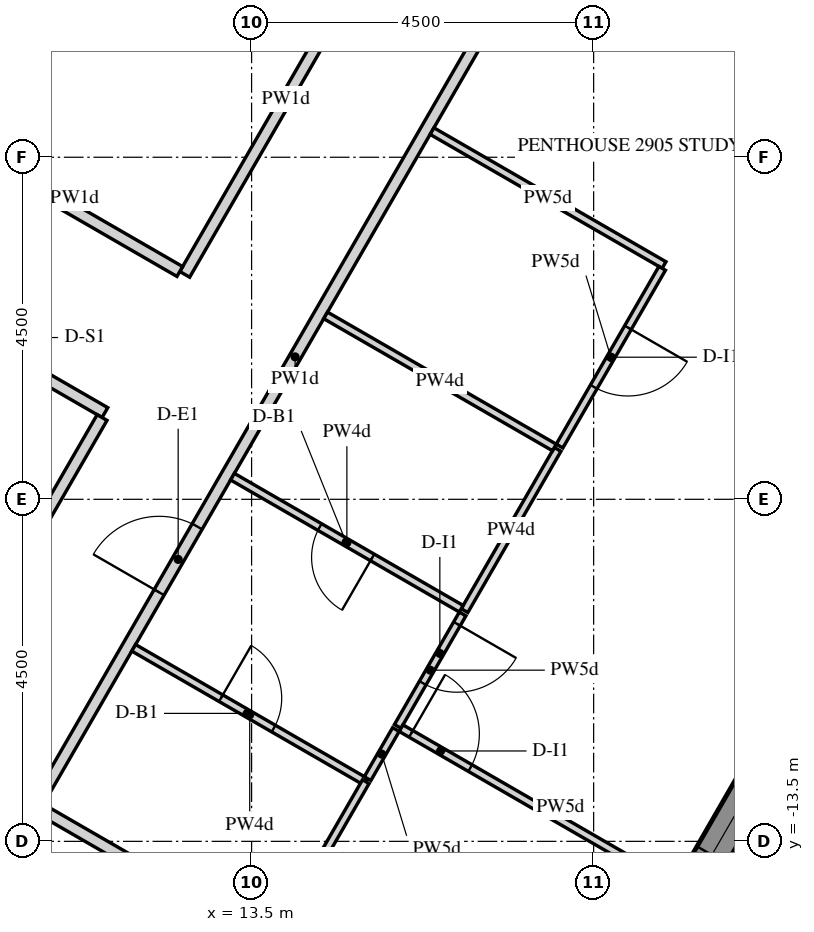
"""IFC4 building model, lengths in metres.
Left out: names, types, materials, properties, quantities, classifications, styles, units other than length and angle.
Written with IfcOpenShell. Run it as: python <this file> out.ifc"""

import sys

from ifc_helpers import new_model, si_unit, direction, frame, frame_2d, origin, place, context, subcontext, project, spatial, polyline, rectangle, outline, extrude, element, fill, save


model = new_model("IFC4")
c1 = context("Model", 3, precision=1e-05, world=origin(), true_north=direction((0.0, 1.0)))
c2 = subcontext(c1, "Body", "Model", "MODEL_VIEW")
j1 = project(units=[si_unit("LENGTHUNIT", "METRE"), si_unit("PLANEANGLEUNIT", "RADIAN")], contexts=[c1])
p1 = place(None, origin())
s1 = spatial("IfcSite", under=j1, at=p1, CompositionType="ELEMENT")
p2 = place(p1, origin())
s2 = spatial("IfcBuilding", under=s1, at=p2, CompositionType="ELEMENT")
p3 = place(p2, frame((0.0, 0.0, 369.0)))
s3 = spatial("IfcBuildingStorey", under=s2, at=p3, CompositionType="ELEMENT", Elevation=369.0)
p4 = place(p3, frame((15.273, -21.097, -0.15), z_axis=(0.0, 0.0, 1.0), x_axis=(0.499997453958, 0.866026873738, 0.0)))
e1 = element("IfcWall", 1, at=p4, inside=s3, PredefinedType="SOLIDWALL", context=c2, shape_type="SweptSolid", body=[
    extrude(outline(polyline([(-0.018, -0.225), (23.152, -0.225), (23.11, 0.225), (0.018, 0.225), (-0.018, -0.225)])), origin(), (0.0, 0.0, 1.0), 3.9),
])
p5 = place(p4, frame((1.366, 0.0, 0.45)))
e2 = element("IfcOpeningElement", 2, at=p5, cuts=e1, PredefinedType="OPENING", context=c2, shape_type="SweptSolid", body=[
    extrude(rectangle(XDim=2.4, YDim=3.0, at=frame_2d((1.2, 1.5))), frame((0.0, 0.235, 0.0), z_axis=(0.0, -1.0, 0.0), x_axis=(1.0, 0.0, 0.0)), (0.0, 0.0, 1.0), 0.47),
])
p6 = place(p4, frame((4.966, 0.0, 0.45)))
e3 = element("IfcOpeningElement", 3, at=p6, cuts=e1, PredefinedType="OPENING", context=c2, shape_type="SweptSolid", body=[
    extrude(rectangle(XDim=2.4, YDim=3.0, at=frame_2d((1.2, 1.5))), frame((0.0, 0.235, 0.0), z_axis=(0.0, -1.0, 0.0), x_axis=(1.0, 0.0, 0.0)), (0.0, 0.0, 1.0), 0.47),
])
p7 = place(p4, frame((8.566, 0.0, 0.45)))
e4 = element("IfcOpeningElement", 4, at=p7, cuts=e1, PredefinedType="OPENING", context=c2, shape_type="SweptSolid", body=[
    extrude(rectangle(XDim=2.4, YDim=3.0, at=frame_2d((1.2, 1.5))), frame((0.0, 0.235, 0.0), z_axis=(0.0, -1.0, 0.0), x_axis=(1.0, 0.0, 0.0)), (0.0, 0.0, 1.0), 0.47),
])
p8 = place(p4, frame((12.166, 0.0, 0.45)))
e5 = element("IfcOpeningElement", 5, at=p8, cuts=e1, PredefinedType="OPENING", context=c2, shape_type="SweptSolid", body=[
    extrude(rectangle(XDim=2.4, YDim=3.0, at=frame_2d((1.2, 1.5))), frame((0.0, 0.235, 0.0), z_axis=(0.0, -1.0, 0.0), x_axis=(1.0, 0.0, 0.0)), (0.0, 0.0, 1.0), 0.47),
])
p9 = place(p4, frame((15.766, 0.0, 0.45)))
e6 = element("IfcOpeningElement", 6, at=p9, cuts=e1, PredefinedType="OPENING", context=c2, shape_type="SweptSolid", body=[
    extrude(rectangle(XDim=2.4, YDim=3.0, at=frame_2d((1.2, 1.5))), frame((0.0, 0.235, 0.0), z_axis=(0.0, -1.0, 0.0), x_axis=(1.0, 0.0, 0.0)), (0.0, 0.0, 1.0), 0.47),
])
p10 = place(p4, frame((19.366, 0.0, 0.45)))
e7 = element("IfcOpeningElement", 7, at=p10, cuts=e1, PredefinedType="OPENING", context=c2, shape_type="SweptSolid", body=[
    extrude(rectangle(XDim=2.4, YDim=3.0, at=frame_2d((1.2, 1.5))), frame((0.0, 0.235, 0.0), z_axis=(0.0, -1.0, 0.0), x_axis=(1.0, 0.0, 0.0)), (0.0, 0.0, 1.0), 0.47),
])
p11 = place(p3, frame((5.673, -9.825, -0.15), z_axis=(0.0, 0.0, 1.0), x_axis=(0.499995046907, 0.866028263435, 0.0)))
e8 = element("IfcWall", 8, at=p11, inside=s3, PredefinedType="SHEAR", context=c2, shape_type="SweptSolid", body=[
    extrude(outline(polyline([(-0.101, -0.175), (11.446, -0.175), (11.244, 0.175), (0.101, 0.175), (-0.101, -0.175)])), origin(), (0.0, 0.0, 1.0), 3.9),
])
p12 = place(p11, frame((4.801, 0.0, 0.15)))
e9 = element("IfcOpeningElement", 9, at=p12, cuts=e8, PredefinedType="OPENING", context=c2, shape_type="SweptSolid", body=[
    extrude(rectangle(XDim=1.8, YDim=2.4, at=frame_2d((0.9, 1.2))), frame((0.0, 0.185, 0.0), z_axis=(0.0, -1.0, 0.0), x_axis=(1.0, 0.0, 0.0)), (0.0, 0.0, 1.0), 0.37),
])
p13 = place(p3, frame((5.773, -10.0, -0.15), z_axis=(0.0, 0.0, 1.0), x_axis=(0.500007911273, -0.866020836161, 0.0)))
e10 = element("IfcWall", 10, at=p13, inside=s3, PredefinedType="SHEAR", context=c2, shape_type="SweptSolid", body=[
    extrude(rectangle(XDim=14.51, YDim=0.35, at=frame_2d((7.255, 0.0))), origin(), (0.0, 0.0, 1.0), 3.9),
])
p14 = place(p13, frame((6.355, 0.0, 0.15)))
e11 = element("IfcOpeningElement", 11, at=p14, cuts=e10, PredefinedType="OPENING", context=c2, shape_type="SweptSolid", body=[
    extrude(rectangle(XDim=1.8, YDim=2.4, at=frame_2d((0.9, 1.2))), frame((0.0, 0.185, 0.0), z_axis=(0.0, -1.0, 0.0), x_axis=(1.0, 0.0, 0.0)), (0.0, 0.0, 1.0), 0.37),
])
p15 = place(p3, frame((10.697, -12.973, 0.0), z_axis=(0.0, 0.0, 1.0), x_axis=(0.499991115059, 0.866030533446, 0.0)))
e12 = element("IfcWall", 12, at=p15, inside=s3, PredefinedType="PARTITIONING", context=c2, shape_type="SweptSolid", body=[
    extrude(rectangle(XDim=13.504, YDim=0.15, at=frame_2d((6.752, 0.0))), origin(), (0.0, 0.0, 1.0), 2.47),
])
p16 = place(p15, frame((3.175, 0.0, 0.0)))
e13 = element("IfcOpeningElement", 13, at=p16, cuts=e12, PredefinedType="OPENING", context=c2, shape_type="SweptSolid", body=[
    extrude(rectangle(XDim=1.0, YDim=2.1, at=frame_2d((0.5, 1.05))), frame((0.0, 0.085, 0.0), z_axis=(0.0, -1.0, 0.0), x_axis=(1.0, 0.0, 0.0)), (0.0, 0.0, 1.0), 0.17),
])
p17 = place(p3, frame((13.777, -14.838, 0.0), z_axis=(0.0, 0.0, 1.0), x_axis=(-0.866047807691, 0.499961193289, 0.0)))
e14 = element("IfcWall", 14, at=p17, inside=s3, PredefinedType="PARTITIONING", context=c2, shape_type="SweptSolid", body=[
    extrude(rectangle(XDim=3.6, YDim=0.15, at=frame_2d((1.8, 0.0))), origin(), (0.0, 0.0, 1.0), 2.47),
])
p18 = place(p3, frame((15.285, -1.425, 0.0), z_axis=(0.0, 0.0, 1.0), x_axis=(-0.499972278664, -0.866041408113, 0.0)))
e15 = element("IfcWall", 15, at=p18, inside=s3, PredefinedType="PARTITIONING", context=c2, shape_type="SweptSolid", body=[
    extrude(rectangle(XDim=5.329, YDim=0.15, at=frame_2d((2.665, 0.0))), origin(), (0.0, 0.0, 1.0), 2.47),
])
p19 = place(p3, frame((12.555, -6.003, 0.0), z_axis=(0.0, 0.0, 1.0), x_axis=(-0.866016658288, 0.500015147339, 0.0)))
e16 = element("IfcWall", 16, at=p19, inside=s3, PredefinedType="PARTITIONING", context=c2, shape_type="SweptSolid", body=[
    extrude(rectangle(XDim=3.875, YDim=0.15, at=frame_2d((1.938, 0.0))), origin(), (0.0, 0.0, 1.0), 2.47),
])
p20 = place(p3, frame((8.15, -5.884, 0.0), z_axis=(0.0, 0.0, 1.0), x_axis=(0.866020906874, -0.500007788796, 0.0)))
e17 = element("IfcWall", 17, at=p20, inside=s3, PredefinedType="PARTITIONING", context=c2, shape_type="SweptSolid", body=[
    extrude(rectangle(XDim=3.95, YDim=0.15, at=frame_2d((1.975, 0.0))), origin(), (0.0, 0.0, 1.0), 2.47),
])
p21 = place(p20, frame((1.525, 0.0, 0.0)))
e18 = element("IfcOpeningElement", 18, at=p21, cuts=e17, PredefinedType="OPENING", context=c2, shape_type="SweptSolid", body=[
    extrude(rectangle(XDim=0.9, YDim=2.1, at=frame_2d((0.45, 1.05))), frame((0.0, 0.085, 0.0), z_axis=(0.0, -1.0, 0.0), x_axis=(1.0, 0.0, 0.0)), (0.0, 0.0, 1.0), 0.17),
])
p22 = place(p3, frame((11.533, -7.924, 0.0), z_axis=(0.0, 0.0, 1.0), x_axis=(-0.500001804394, -0.866024362014, 0.0)))
e19 = element("IfcWall", 19, at=p22, inside=s3, PredefinedType="PARTITIONING", context=c2, shape_type="SweptSolid", body=[
    extrude(rectangle(XDim=3.909, YDim=0.15, at=frame_2d((1.954, 0.0))), origin(), (0.0, 0.0, 1.0), 2.47),
])
p23 = place(p3, frame((16.277, -10.508, 0.0), z_axis=(0.0, 0.0, 1.0), x_axis=(-0.500027584368, -0.866009477356, 0.0)))
e20 = element("IfcWall", 20, at=p23, inside=s3, PredefinedType="PARTITIONING", context=c2, shape_type="SweptSolid", body=[
    extrude(rectangle(XDim=1.708, YDim=0.1, at=frame_2d((0.854, 0.0))), origin(), (0.0, 0.0, 1.0), 2.47),
])
p24 = place(p23, frame((0.15, 0.0, 0.0)))
e21 = element("IfcOpeningElement", 21, at=p24, cuts=e20, PredefinedType="OPENING", context=c2, shape_type="SweptSolid", body=[
    extrude(rectangle(XDim=0.9, YDim=2.1, at=frame_2d((0.45, 1.05))), frame((0.0, 0.06, 0.0), z_axis=(0.0, -1.0, 0.0), x_axis=(1.0, 0.0, 0.0)), (0.0, 0.0, 1.0), 0.12),
])
p25 = place(p3, frame((15.467, -12.011, 0.0), z_axis=(0.0, 0.0, 1.0), x_axis=(0.86602981871, -0.499992353047, 0.0)))
e22 = element("IfcWall", 22, at=p25, inside=s3, PredefinedType="PARTITIONING", context=c2, shape_type="SweptSolid", body=[
    extrude(rectangle(XDim=4.15, YDim=0.1, at=frame_2d((2.075, 0.0))), origin(), (0.0, 0.0, 1.0), 2.47),
])
p26 = place(p25, frame((0.15, 0.0, 0.0)))
e23 = element("IfcOpeningElement", 23, at=p26, cuts=e22, PredefinedType="OPENING", context=c2, shape_type="SweptSolid", body=[
    extrude(rectangle(XDim=0.9, YDim=2.1, at=frame_2d((0.45, 1.05))), frame((0.0, 0.06, 0.0), z_axis=(0.0, -1.0, 0.0), x_axis=(1.0, 0.0, 0.0)), (0.0, 0.0, 1.0), 0.12),
])
p27 = place(p3, frame((17.527, -8.343, 0.0), z_axis=(0.0, 0.0, 1.0), x_axis=(-0.500018594424, -0.866014668023, 0.0)))
e24 = element("IfcWall", 24, at=p27, inside=s3, PredefinedType="PARTITIONING", context=c2, shape_type="SweptSolid", body=[
    extrude(rectangle(XDim=2.45, YDim=0.1, at=frame_2d((1.225, 0.0))), origin(), (0.0, 0.0, 1.0), 2.47),
])
p28 = place(p3, frame((15.874, -4.156, 0.0), z_axis=(0.0, 0.0, 1.0), x_axis=(0.866031034943, -0.499990246421, 0.0)))
e25 = element("IfcWall", 25, at=p28, inside=s3, PredefinedType="PARTITIONING", context=c2, shape_type="SweptSolid", body=[
    extrude(rectangle(XDim=3.525, YDim=0.1, at=frame_2d((1.762, 0.0))), origin(), (0.0, 0.0, 1.0), 2.47),
])
p29 = place(p3, frame((18.902, -5.961, 0.0), z_axis=(0.0, 0.0, 1.0), x_axis=(-0.50000943426, -0.866019956843, 0.0)))
e26 = element("IfcWall", 26, at=p29, inside=s3, PredefinedType="PARTITIONING", context=c2, shape_type="SweptSolid", body=[
    extrude(rectangle(XDim=2.7, YDim=0.1, at=frame_2d((1.35, 0.0))), origin(), (0.0, 0.0, 1.0), 2.47),
])
p30 = place(p29, frame((0.9, 0.0, 0.0)))
e27 = element("IfcOpeningElement", 27, at=p30, cuts=e26, PredefinedType="OPENING", context=c2, shape_type="SweptSolid", body=[
    extrude(rectangle(XDim=0.9, YDim=2.1, at=frame_2d((0.45, 1.05))), frame((0.0, 0.06, 0.0), z_axis=(0.0, -1.0, 0.0), x_axis=(1.0, 0.0, 0.0)), (0.0, 0.0, 1.0), 0.12),
])
p31 = place(p3, frame((11.949, -10.954, 0.0), z_axis=(0.0, 0.0, 1.0), x_axis=(0.866001044215, -0.500042189638, 0.0)))
e28 = element("IfcWall", 28, at=p31, inside=s3, PredefinedType="PARTITIONING", context=c2, shape_type="SweptSolid", body=[
    extrude(rectangle(XDim=3.525, YDim=0.1, at=frame_2d((1.763, 0.0))), origin(), (0.0, 0.0, 1.0), 2.47),
])
p32 = place(p31, frame((1.325, 0.0, 0.0)))
e29 = element("IfcOpeningElement", 29, at=p32, cuts=e28, PredefinedType="OPENING", context=c2, shape_type="SweptSolid", body=[
    extrude(rectangle(XDim=0.8, YDim=2.1, at=frame_2d((0.4, 1.05))), frame((0.0, 0.06, 0.0), z_axis=(0.0, -1.0, 0.0), x_axis=(1.0, 0.0, 0.0)), (0.0, 0.0, 1.0), 0.12),
])
p33 = place(p3, frame((15.026, -12.675, 0.0), z_axis=(0.0, 0.0, 1.0), x_axis=(0.500119347963, 0.86595648724, 0.0)))
e30 = element("IfcWall", 30, at=p33, inside=s3, PredefinedType="PARTITIONING", context=c2, shape_type="SweptSolid", body=[
    extrude(rectangle(XDim=0.745, YDim=0.1, at=frame_2d((0.373, 0.0))), origin(), (0.0, 0.0, 1.0), 2.47),
])
p34 = place(p3, frame((16.258, -10.44, 0.0), z_axis=(0.0, 0.0, 1.0), x_axis=(-0.866055725969, 0.499947476758, 0.0)))
e31 = element("IfcWall", 31, at=p34, inside=s3, PredefinedType="PARTITIONING", context=c2, shape_type="SweptSolid", body=[
    extrude(rectangle(XDim=3.475, YDim=0.1, at=frame_2d((1.737, 0.0))), origin(), (0.0, 0.0, 1.0), 2.47),
])
p35 = place(p34, frame((1.35, 0.0, 0.0)))
e32 = element("IfcOpeningElement", 32, at=p35, cuts=e31, PredefinedType="OPENING", context=c2, shape_type="SweptSolid", body=[
    extrude(rectangle(XDim=0.8, YDim=2.1, at=frame_2d((0.4, 1.05))), frame((0.0, 0.06, 0.0), z_axis=(0.0, -1.0, 0.0), x_axis=(1.0, 0.0, 0.0)), (0.0, 0.0, 1.0), 0.12),
])
p36 = place(p3, frame((13.813, -14.775, 0.0), z_axis=(0.0, 0.0, 1.0), x_axis=(0.500101476366, 0.86596680845, 0.0)))
e33 = element("IfcWall", 33, at=p36, inside=s3, PredefinedType="PARTITIONING", context=c2, shape_type="SweptSolid", body=[
    extrude(rectangle(XDim=2.379, YDim=0.1, at=frame_2d((1.189, 0.0))), origin(), (0.0, 0.0, 1.0), 2.47),
])
p37 = place(p3, frame((17.483, -8.318, 0.0), z_axis=(0.0, 0.0, 1.0), x_axis=(-0.866025305473, 0.500000170281, 0.0)))
e34 = element("IfcWall", 34, at=p37, inside=s3, PredefinedType="PARTITIONING", context=c2, shape_type="SweptSolid", body=[
    extrude(rectangle(XDim=3.475, YDim=0.1, at=frame_2d((1.738, 0.0))), origin(), (0.0, 0.0, 1.0), 2.47),
])
p38 = place(p7, frame((0.0, 0.155, 0.0)))
e35 = element("IfcWindow", 35, at=p38, inside=s3, PartitioningType="DOUBLE_PANEL_VERTICAL", PredefinedType="WINDOW", context=c2, shape_type="SweptSolid", body=[
    extrude(rectangle(XDim=2.4, YDim=3.0, at=frame_2d((1.2, 1.5))), frame((0.0, 0.03, 0.0), z_axis=(0.0, -1.0, 0.0), x_axis=(1.0, 0.0, 0.0)), (0.0, 0.0, 1.0), 0.06),
])
fill(e4, e35)
p39 = place(p16, origin())
e36 = element("IfcDoor", 36, at=p39, inside=s3, OperationType="SINGLE_SWING_LEFT", PredefinedType="DOOR", context=c2, shape_type="SweptSolid", body=[
    extrude(rectangle(XDim=1.0, YDim=2.1, at=frame_2d((0.5, 1.05))), frame((0.0, 0.025, 0.0), z_axis=(0.0, -1.0, 0.0), x_axis=(1.0, 0.0, 0.0)), (0.0, 0.0, 1.0), 0.05),
])
fill(e13, e36)
p40 = place(p32, origin())
e37 = element("IfcDoor", 37, at=p40, inside=s3, OperationType="SINGLE_SWING_RIGHT", PredefinedType="DOOR", context=c2, shape_type="SweptSolid", body=[
    extrude(rectangle(XDim=0.8, YDim=2.1, at=frame_2d((0.4, 1.05))), frame((0.0, 0.025, 0.0), z_axis=(0.0, -1.0, 0.0), x_axis=(1.0, 0.0, 0.0)), (0.0, 0.0, 1.0), 0.05),
])
fill(e29, e37)
p41 = place(p24, origin())
e38 = element("IfcDoor", 38, at=p41, inside=s3, OperationType="SINGLE_SWING_RIGHT", PredefinedType="DOOR", context=c2, shape_type="SweptSolid", body=[
    extrude(rectangle(XDim=0.9, YDim=2.1, at=frame_2d((0.45, 1.05))), frame((0.0, 0.025, 0.0), z_axis=(0.0, -1.0, 0.0), x_axis=(1.0, 0.0, 0.0)), (0.0, 0.0, 1.0), 0.05),
])
fill(e21, e38)
p42 = place(p26, origin())
e39 = element("IfcDoor", 39, at=p42, inside=s3, OperationType="SINGLE_SWING_RIGHT", PredefinedType="DOOR", context=c2, shape_type="SweptSolid", body=[
    extrude(rectangle(XDim=0.9, YDim=2.1, at=frame_2d((0.45, 1.05))), frame((0.0, 0.025, 0.0), z_axis=(0.0, -1.0, 0.0), x_axis=(1.0, 0.0, 0.0)), (0.0, 0.0, 1.0), 0.05),
])
fill(e23, e39)
p43 = place(p35, origin())
e40 = element("IfcDoor", 40, at=p43, inside=s3, OperationType="SINGLE_SWING_LEFT", PredefinedType="DOOR", context=c2, shape_type="SweptSolid", body=[
    extrude(rectangle(XDim=0.8, YDim=2.1, at=frame_2d((0.4, 1.05))), frame((0.0, 0.025, 0.0), z_axis=(0.0, -1.0, 0.0), x_axis=(1.0, 0.0, 0.0)), (0.0, 0.0, 1.0), 0.05),
])
fill(e32, e40)
p44 = place(p30, origin())
e41 = element("IfcDoor", 41, at=p44, inside=s3, OperationType="SINGLE_SWING_RIGHT", PredefinedType="DOOR", context=c2, shape_type="SweptSolid", body=[
    extrude(rectangle(XDim=0.9, YDim=2.1, at=frame_2d((0.45, 1.05))), frame((0.0, 0.025, 0.0), z_axis=(0.0, -1.0, 0.0), x_axis=(1.0, 0.0, 0.0)), (0.0, 0.0, 1.0), 0.05),
])
fill(e27, e41)
save(model, sys.argv[1])
